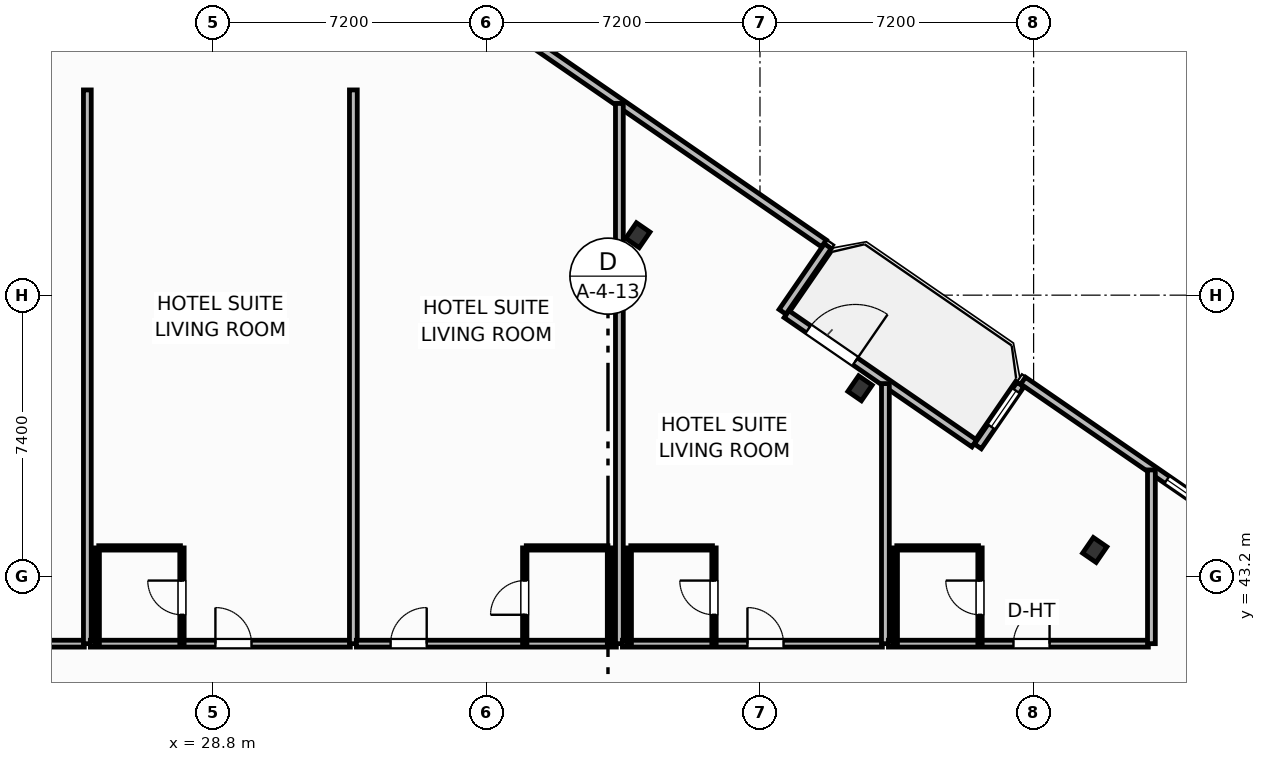
"""IFC4 building model, lengths in metres.
Left out: names, types, materials, properties, quantities, classifications, styles, units other than length and angle.
Written with IfcOpenShell. Run it as: python <this file> out.ifc"""

import sys

from ifc_helpers import new_model, si_unit, direction, frame, frame_2d, origin, origin_2d, place, context, subcontext, project, spatial, rectangle, i_section, extrude, element, fill, save


model = new_model("IFC4")
c1 = context("Model", 3, precision=1e-05, world=origin(), true_north=direction((0.0, 1.0)))
c2 = subcontext(c1, "Body", "Model", "MODEL_VIEW")
j1 = project(units=[si_unit("LENGTHUNIT", "METRE"), si_unit("PLANEANGLEUNIT", "RADIAN")], contexts=[c1])
p1 = place(None, origin())
s1 = spatial("IfcSite", under=j1, at=p1, CompositionType="ELEMENT")
p2 = place(p1, origin())
s2 = spatial("IfcBuilding", under=s1, at=p2, CompositionType="ELEMENT")
p3 = place(p2, frame((0.0, 0.0, 34.4)))
s3 = spatial("IfcBuildingStorey", under=s2, at=p3, CompositionType="ELEMENT", Elevation=34.4)
for number, where, z_axis, x_axis in (
    (1, (52.009, 43.896, 0.0), (0.0, 0.0, 1.0), (0.824, -0.567, 0.0)),
    (2, (45.833, 48.15, 0.0), (0.0, 0.0, 1.0), (0.824, -0.567, 0.0)),
    (3, (39.985, 52.177, 0.0), (0.0, 0.0, 1.0), (0.824, -0.567, 0.0)),
):
    element("IfcColumn", number, at=place(p3, frame(where, z_axis=z_axis, x_axis=x_axis)), inside=s3, PredefinedType="COLUMN", context=c2, shape_type="SweptSolid", body=[
        extrude(i_section(OverallWidth=0.432, OverallDepth=0.498, WebThickness=0.056, FlangeThickness=0.089, FilletRadius=0.025, at=origin_2d()), origin(), (0.0, 0.0, 1.0), 3.7),
    ])
p4 = place(p3, frame((43.898, 50.102, 0.0), z_axis=(0.0, 0.0, 1.0), x_axis=(0.823534636215, -0.567265989598, 0.0)))
e4 = element("IfcWall", 4, at=p4, inside=s3, PredefinedType="SOLIDWALL", context=c2, shape_type="SweptSolid", body=[
    extrude(rectangle(XDim=6.0, YDim=0.22, at=frame_2d((3.0, 0.0))), origin(), (0.0, 0.0, 1.0), 2.73),
])
p5 = place(p4, frame((0.696, 0.0, 0.0)))
e5 = element("IfcOpeningElement", 5, at=p5, cuts=e4, PredefinedType="OPENING", context=c2, shape_type="SweptSolid", body=[
    extrude(rectangle(XDim=1.5, YDim=2.25, at=frame_2d((0.75, 1.125))), frame((0.0, 0.12, 0.0), z_axis=(0.0, -1.0, 0.0), x_axis=(1.0, 0.0, 0.0)), (0.0, 0.0, 1.0), 0.24),
])
p6 = place(p3, frame((56.741, 43.793, 0.0), z_axis=(0.0, 0.0, 1.0), x_axis=(-0.823530942962, 0.56727135128, 0.0)))
e6 = element("IfcWall", 6, at=p6, inside=s3, PredefinedType="SOLIDWALL", context=c2, shape_type="SweptSolid", body=[
    extrude(rectangle(XDim=8.035, YDim=0.22, at=frame_2d((4.018, 0.0))), origin(), (0.0, 0.0, 1.0), 2.73),
])
p7 = place(p6, frame((1.788, 0.0, 0.8)))
e7 = element("IfcOpeningElement", 7, at=p7, cuts=e6, PredefinedType="OPENING", context=c2, shape_type="SweptSolid", body=[
    extrude(rectangle(XDim=1.65, YDim=1.65, at=frame_2d((0.825, 0.825))), frame((0.0, 0.12, 0.0), z_axis=(0.0, -1.0, 0.0), x_axis=(1.0, 0.0, 0.0)), (0.0, 0.0, 1.0), 0.24),
])
p8 = place(p3, frame((50.053, 48.248, 0.0), z_axis=(0.0, 0.0, 1.0), x_axis=(-0.567273565974, -0.823529417415, 0.0)))
e8 = element("IfcWall", 8, at=p8, inside=s3, PredefinedType="SOLIDWALL", context=c2, shape_type="SweptSolid", body=[
    extrude(rectangle(XDim=1.975, YDim=0.22, at=frame_2d((0.988, 0.0))), origin(), (0.0, 0.0, 1.0), 2.73),
])
p9 = place(p8, frame((0.2, 0.0, 0.8)))
e9 = element("IfcOpeningElement", 9, at=p9, cuts=e8, PredefinedType="OPENING", context=c2, shape_type="SweptSolid", body=[
    extrude(rectangle(XDim=1.15, YDim=1.4, at=frame_2d((0.575, 0.7))), frame((0.0, 0.12, 0.0), z_axis=(0.0, -1.0, 0.0), x_axis=(1.0, 0.0, 0.0)), (0.0, 0.0, 1.0), 0.24),
])
p10 = place(p3, frame((43.794, 50.161, 0.0), z_axis=(0.0, 0.0, 1.0), x_axis=(0.567352541689, 0.823475010816, 0.0)))
e10 = element("IfcWall", 10, at=p10, inside=s3, PredefinedType="SOLIDWALL", context=c2, shape_type="SweptSolid", body=[
    extrude(rectangle(XDim=2.1, YDim=0.22, at=frame_2d((1.05, 0.0))), origin(), (0.0, 0.0, 1.0), 2.73),
])
p11 = place(p3, frame((44.882, 51.962, 0.0), z_axis=(0.0, 0.0, 1.0), x_axis=(-0.823534427573, 0.567266292497, 0.0)))
e11 = element("IfcWall", 11, at=p11, inside=s3, PredefinedType="SOLIDWALL", context=c2, shape_type="SweptSolid", body=[
    extrude(rectangle(XDim=23.147, YDim=0.22, at=frame_2d((11.574, 0.0))), origin(), (0.0, 0.0, 1.0), 2.73),
])
p12 = place(p11, frame((10.749, 0.0, 0.8)))
e12 = element("IfcOpeningElement", 12, at=p12, cuts=e11, PredefinedType="OPENING", context=c2, shape_type="SweptSolid", body=[
    extrude(rectangle(XDim=1.65, YDim=1.65, at=frame_2d((0.825, 0.825))), frame((0.0, 0.12, 0.0), z_axis=(0.0, -1.0, 0.0), x_axis=(1.0, 0.0, 0.0)), (0.0, 0.0, 1.0), 0.24),
])
p13 = place(p3, frame((2.921, 41.43, 0.0), z_axis=(0.0, 0.0, 1.0), x_axis=(1.0, 0.0, 0.0)))
e13 = element("IfcWall", 13, at=p13, inside=s3, PredefinedType="PARTITIONING", context=c2, shape_type="SweptSolid", body=[
    extrude(rectangle(XDim=22.499, YDim=0.18, at=frame_2d((11.25, 0.0))), origin(), (0.0, 0.0, 1.0), 3.45),
])
p14 = place(p13, frame((18.35, 0.0, 0.0)))
e14 = element("IfcOpeningElement", 14, at=p14, cuts=e13, PredefinedType="OPENING", context=c2, shape_type="SweptSolid", body=[
    extrude(rectangle(XDim=0.95, YDim=2.15, at=frame_2d((0.475, 1.075))), frame((0.0, 0.1, 0.0), z_axis=(0.0, -1.0, 0.0), x_axis=(1.0, 0.0, 0.0)), (0.0, 0.0, 1.0), 0.2),
])
p15 = place(p3, frame((25.5, 41.43, 0.0), z_axis=(0.0, 0.0, 1.0), x_axis=(0.0, 1.0, 0.0)))
e15 = element("IfcWall", 15, at=p15, inside=s3, PredefinedType="PARTITIONING", context=c2, shape_type="SweptSolid", body=[
    extrude(rectangle(XDim=14.57, YDim=0.205, at=frame_2d((7.285, 0.0))), origin(), (0.0, 0.0, 1.0), 3.45),
])
p16 = place(p3, frame((25.58, 41.43, 0.0), z_axis=(0.0, 0.0, 1.0), x_axis=(1.0, 0.0, 0.0)))
e16 = element("IfcWall", 16, at=p16, inside=s3, PredefinedType="PARTITIONING", context=c2, shape_type="SweptSolid", body=[
    extrude(rectangle(XDim=6.84, YDim=0.18, at=frame_2d((3.42, 0.0))), origin(), (0.0, 0.0, 1.0), 3.45),
])
p17 = place(p16, frame((3.29, 0.0, 0.0)))
e17 = element("IfcOpeningElement", 17, at=p17, cuts=e16, PredefinedType="OPENING", context=c2, shape_type="SweptSolid", body=[
    extrude(rectangle(XDim=0.95, YDim=2.15, at=frame_2d((0.475, 1.075))), frame((0.0, 0.1, 0.0), z_axis=(0.0, -1.0, 0.0), x_axis=(1.0, 0.0, 0.0)), (0.0, 0.0, 1.0), 0.2),
])
p18 = place(p3, frame((25.8, 43.95, 0.0), z_axis=(0.0, 0.0, 1.0), x_axis=(1.0, 0.0, 0.0)))
e18 = element("IfcWall", 18, at=p18, inside=s3, PredefinedType="PARTITIONING", context=c2, shape_type="SweptSolid", body=[
    extrude(rectangle(XDim=2.15, YDim=0.115, at=frame_2d((1.075, 0.0))), origin(), (0.0, 0.0, 1.0), 3.45),
])
p19 = place(p3, frame((27.99, 41.43, 0.0), z_axis=(0.0, 0.0, 1.0), x_axis=(0.0, 1.0, 0.0)))
e19 = element("IfcWall", 19, at=p19, inside=s3, PredefinedType="PARTITIONING", context=c2, shape_type="SweptSolid", body=[
    extrude(rectangle(XDim=2.52, YDim=0.115, at=frame_2d((1.26, 0.0))), origin(), (0.0, 0.0, 1.0), 3.45),
])
p20 = place(p19, frame((0.76, 0.0, 0.0)))
e20 = element("IfcOpeningElement", 20, at=p20, cuts=e19, PredefinedType="OPENING", context=c2, shape_type="SweptSolid", body=[
    extrude(rectangle(XDim=0.9, YDim=2.05, at=frame_2d((0.45, 1.025))), frame((0.0, 0.067, 0.0), z_axis=(0.0, -1.0, 0.0), x_axis=(1.0, 0.0, 0.0)), (0.0, 0.0, 1.0), 0.135),
])
p21 = place(p3, frame((25.76, 41.43, 0.0), z_axis=(0.0, 0.0, 1.0), x_axis=(0.0, 1.0, 0.0)))
e21 = element("IfcWall", 21, at=p21, inside=s3, PredefinedType="PARTITIONING", context=c2, shape_type="SweptSolid", body=[
    extrude(rectangle(XDim=2.52, YDim=0.115, at=frame_2d((1.26, 0.0))), origin(), (0.0, 0.0, 1.0), 3.45),
])
p22 = place(p3, frame((32.5, 41.43, 0.0), z_axis=(0.0, 0.0, 1.0), x_axis=(0.0, 1.0, 0.0)))
e22 = element("IfcWall", 22, at=p22, inside=s3, PredefinedType="PARTITIONING", context=c2, shape_type="SweptSolid", body=[
    extrude(rectangle(XDim=14.57, YDim=0.205, at=frame_2d((7.285, 0.0))), origin(), (0.0, 0.0, 1.0), 3.45),
])
p23 = place(p3, frame((32.58, 41.43, 0.0), z_axis=(0.0, 0.0, 1.0), x_axis=(1.0, 0.0, 0.0)))
e23 = element("IfcWall", 23, at=p23, inside=s3, PredefinedType="PARTITIONING", context=c2, shape_type="SweptSolid", body=[
    extrude(rectangle(XDim=6.84, YDim=0.18, at=frame_2d((3.42, 0.0))), origin(), (0.0, 0.0, 1.0), 3.45),
])
p24 = place(p23, frame((0.9, 0.0, 0.0)))
e24 = element("IfcOpeningElement", 24, at=p24, cuts=e23, PredefinedType="OPENING", context=c2, shape_type="SweptSolid", body=[
    extrude(rectangle(XDim=0.95, YDim=2.15, at=frame_2d((0.475, 1.075))), frame((0.0, 0.1, 0.0), z_axis=(0.0, -1.0, 0.0), x_axis=(1.0, 0.0, 0.0)), (0.0, 0.0, 1.0), 0.2),
])
p25 = place(p3, frame((37.05, 43.95, 0.0), z_axis=(0.0, 0.0, 1.0), x_axis=(1.0, 0.0, 0.0)))
e25 = element("IfcWall", 25, at=p25, inside=s3, PredefinedType="PARTITIONING", context=c2, shape_type="SweptSolid", body=[
    extrude(rectangle(XDim=2.15, YDim=0.115, at=frame_2d((1.075, 0.0))), origin(), (0.0, 0.0, 1.0), 3.45),
])
p26 = place(p3, frame((37.01, 41.43, 0.0), z_axis=(0.0, 0.0, 1.0), x_axis=(0.0, 1.0, 0.0)))
e26 = element("IfcWall", 26, at=p26, inside=s3, PredefinedType="PARTITIONING", context=c2, shape_type="SweptSolid", body=[
    extrude(rectangle(XDim=2.52, YDim=0.115, at=frame_2d((1.26, 0.0))), origin(), (0.0, 0.0, 1.0), 3.45),
])
p27 = place(p26, frame((0.76, 0.0, 0.0)))
e27 = element("IfcOpeningElement", 27, at=p27, cuts=e26, PredefinedType="OPENING", context=c2, shape_type="SweptSolid", body=[
    extrude(rectangle(XDim=0.9, YDim=2.05, at=frame_2d((0.45, 1.025))), frame((0.0, 0.067, 0.0), z_axis=(0.0, -1.0, 0.0), x_axis=(1.0, 0.0, 0.0)), (0.0, 0.0, 1.0), 0.135),
])
p28 = place(p3, frame((39.24, 41.43, 0.0), z_axis=(0.0, 0.0, 1.0), x_axis=(0.0, 1.0, 0.0)))
e28 = element("IfcWall", 28, at=p28, inside=s3, PredefinedType="PARTITIONING", context=c2, shape_type="SweptSolid", body=[
    extrude(rectangle(XDim=2.52, YDim=0.115, at=frame_2d((1.26, 0.0))), origin(), (0.0, 0.0, 1.0), 3.45),
])
p29 = place(p3, frame((39.5, 41.43, 0.0), z_axis=(0.0, 0.0, 1.0), x_axis=(0.0, 1.0, 0.0)))
e29 = element("IfcWall", 29, at=p29, inside=s3, PredefinedType="PARTITIONING", context=c2, shape_type="SweptSolid", body=[
    extrude(rectangle(XDim=14.215, YDim=0.205, at=frame_2d((7.107, 0.0))), origin(), (0.0, 0.0, 1.0), 3.45),
])
p30 = place(p3, frame((39.58, 41.43, 0.0), z_axis=(0.0, 0.0, 1.0), x_axis=(1.0, 0.0, 0.0)))
e30 = element("IfcWall", 30, at=p30, inside=s3, PredefinedType="PARTITIONING", context=c2, shape_type="SweptSolid", body=[
    extrude(rectangle(XDim=6.84, YDim=0.18, at=frame_2d((3.42, 0.0))), origin(), (0.0, 0.0, 1.0), 3.45),
])
p31 = place(p30, frame((3.29, 0.0, 0.0)))
e31 = element("IfcOpeningElement", 31, at=p31, cuts=e30, PredefinedType="OPENING", context=c2, shape_type="SweptSolid", body=[
    extrude(rectangle(XDim=0.95, YDim=2.15, at=frame_2d((0.475, 1.075))), frame((0.0, 0.1, 0.0), z_axis=(0.0, -1.0, 0.0), x_axis=(1.0, 0.0, 0.0)), (0.0, 0.0, 1.0), 0.2),
])
p32 = place(p3, frame((39.8, 43.95, 0.0), z_axis=(0.0, 0.0, 1.0), x_axis=(1.0, 0.0, 0.0)))
e32 = element("IfcWall", 32, at=p32, inside=s3, PredefinedType="PARTITIONING", context=c2, shape_type="SweptSolid", body=[
    extrude(rectangle(XDim=2.15, YDim=0.115, at=frame_2d((1.075, 0.0))), origin(), (0.0, 0.0, 1.0), 3.45),
])
p33 = place(p3, frame((41.99, 41.43, 0.0), z_axis=(0.0, 0.0, 1.0), x_axis=(0.0, 1.0, 0.0)))
e33 = element("IfcWall", 33, at=p33, inside=s3, PredefinedType="PARTITIONING", context=c2, shape_type="SweptSolid", body=[
    extrude(rectangle(XDim=2.52, YDim=0.115, at=frame_2d((1.26, 0.0))), origin(), (0.0, 0.0, 1.0), 3.45),
])
p34 = place(p33, frame((0.76, 0.0, 0.0)))
e34 = element("IfcOpeningElement", 34, at=p34, cuts=e33, PredefinedType="OPENING", context=c2, shape_type="SweptSolid", body=[
    extrude(rectangle(XDim=0.9, YDim=2.05, at=frame_2d((0.45, 1.025))), frame((0.0, 0.067, 0.0), z_axis=(0.0, -1.0, 0.0), x_axis=(1.0, 0.0, 0.0)), (0.0, 0.0, 1.0), 0.135),
])
p35 = place(p3, frame((39.76, 41.43, 0.0), z_axis=(0.0, 0.0, 1.0), x_axis=(0.0, 1.0, 0.0)))
e35 = element("IfcWall", 35, at=p35, inside=s3, PredefinedType="PARTITIONING", context=c2, shape_type="SweptSolid", body=[
    extrude(rectangle(XDim=2.52, YDim=0.115, at=frame_2d((1.26, 0.0))), origin(), (0.0, 0.0, 1.0), 3.45),
])
p36 = place(p3, frame((46.5, 41.43, 0.0), z_axis=(0.0, 0.0, 1.0), x_axis=(0.0, 1.0, 0.0)))
e36 = element("IfcWall", 36, at=p36, inside=s3, PredefinedType="PARTITIONING", context=c2, shape_type="SweptSolid", body=[
    extrude(rectangle(XDim=6.843, YDim=0.205, at=frame_2d((3.421, 0.0))), origin(), (0.0, 0.0, 1.0), 2.58),
])
p37 = place(p3, frame((46.58, 41.43, 0.0), z_axis=(0.0, 0.0, 1.0), x_axis=(1.0, 0.0, 0.0)))
e37 = element("IfcWall", 37, at=p37, inside=s3, PredefinedType="PARTITIONING", context=c2, shape_type="SweptSolid", body=[
    extrude(rectangle(XDim=6.84, YDim=0.18, at=frame_2d((3.42, 0.0))), origin(), (0.0, 0.0, 1.0), 3.45),
])
p38 = place(p37, frame((3.29, 0.0, 0.0)))
e38 = element("IfcOpeningElement", 38, at=p38, cuts=e37, PredefinedType="OPENING", context=c2, shape_type="SweptSolid", body=[
    extrude(rectangle(XDim=0.95, YDim=2.15, at=frame_2d((0.475, 1.075))), frame((0.0, 0.1, 0.0), z_axis=(0.0, -1.0, 0.0), x_axis=(1.0, 0.0, 0.0)), (0.0, 0.0, 1.0), 0.2),
])
p39 = place(p3, frame((46.8, 43.95, 0.0), z_axis=(0.0, 0.0, 1.0), x_axis=(1.0, 0.0, 0.0)))
e39 = element("IfcWall", 39, at=p39, inside=s3, PredefinedType="PARTITIONING", context=c2, shape_type="SweptSolid", body=[
    extrude(rectangle(XDim=2.15, YDim=0.115, at=frame_2d((1.075, 0.0))), origin(), (0.0, 0.0, 1.0), 3.45),
])
p40 = place(p3, frame((48.99, 41.43, 0.0), z_axis=(0.0, 0.0, 1.0), x_axis=(0.0, 1.0, 0.0)))
e40 = element("IfcWall", 40, at=p40, inside=s3, PredefinedType="PARTITIONING", context=c2, shape_type="SweptSolid", body=[
    extrude(rectangle(XDim=2.52, YDim=0.115, at=frame_2d((1.26, 0.0))), origin(), (0.0, 0.0, 1.0), 3.45),
])
p41 = place(p40, frame((0.76, 0.0, 0.0)))
e41 = element("IfcOpeningElement", 41, at=p41, cuts=e40, PredefinedType="OPENING", context=c2, shape_type="SweptSolid", body=[
    extrude(rectangle(XDim=0.9, YDim=2.05, at=frame_2d((0.45, 1.025))), frame((0.0, 0.067, 0.0), z_axis=(0.0, -1.0, 0.0), x_axis=(1.0, 0.0, 0.0)), (0.0, 0.0, 1.0), 0.135),
])
p42 = place(p3, frame((46.76, 41.43, 0.0), z_axis=(0.0, 0.0, 1.0), x_axis=(0.0, 1.0, 0.0)))
e42 = element("IfcWall", 42, at=p42, inside=s3, PredefinedType="PARTITIONING", context=c2, shape_type="SweptSolid", body=[
    extrude(rectangle(XDim=2.52, YDim=0.115, at=frame_2d((1.26, 0.0))), origin(), (0.0, 0.0, 1.0), 2.58),
])
p43 = place(p3, frame((53.5, 41.43, 0.0), z_axis=(0.0, 0.0, 1.0), x_axis=(0.0, 1.0, 0.0)))
e43 = element("IfcWall", 43, at=p43, inside=s3, PredefinedType="PARTITIONING", context=c2, shape_type="SweptSolid", body=[
    extrude(rectangle(XDim=4.571, YDim=0.205, at=frame_2d((2.286, 0.0))), origin(), (0.0, 0.0, 1.0), 3.45),
])
p44 = place(p5, origin())
e44 = element("IfcDoor", 44, at=p44, inside=s3, OperationType="SINGLE_SWING_RIGHT", PredefinedType="DOOR", context=c2, shape_type="SweptSolid", body=[
    extrude(rectangle(XDim=1.5, YDim=2.25, at=frame_2d((0.75, 1.125))), frame((0.0, 0.025, 0.0), z_axis=(0.0, -1.0, 0.0), x_axis=(1.0, 0.0, 0.0)), (0.0, 0.0, 1.0), 0.05),
])
fill(e5, e44)
p45 = place(p7, origin())
e45 = element("IfcWindow", 45, at=p45, inside=s3, PartitioningType="SINGLE_PANEL", PredefinedType="WINDOW", context=c2, shape_type="SweptSolid", body=[
    extrude(rectangle(XDim=1.65, YDim=1.65, at=frame_2d((0.825, 0.825))), frame((0.0, 0.03, 0.0), z_axis=(0.0, -1.0, 0.0), x_axis=(1.0, 0.0, 0.0)), (0.0, 0.0, 1.0), 0.06),
])
fill(e7, e45)
p46 = place(p17, origin())
e46 = element("IfcDoor", 46, at=p46, inside=s3, OperationType="SINGLE_SWING_LEFT", PredefinedType="DOOR", context=c2, shape_type="SweptSolid", body=[
    extrude(rectangle(XDim=0.95, YDim=2.15, at=frame_2d((0.475, 1.075))), frame((0.0, 0.025, 0.0), z_axis=(0.0, -1.0, 0.0), x_axis=(1.0, 0.0, 0.0)), (0.0, 0.0, 1.0), 0.05),
])
fill(e17, e46)
p47 = place(p20, origin())
e47 = element("IfcDoor", 47, at=p47, inside=s3, OperationType="SINGLE_SWING_RIGHT", PredefinedType="DOOR", context=c2, shape_type="SweptSolid", body=[
    extrude(rectangle(XDim=0.9, YDim=2.05, at=frame_2d((0.45, 1.025))), frame((0.0, 0.025, 0.0), z_axis=(0.0, -1.0, 0.0), x_axis=(1.0, 0.0, 0.0)), (0.0, 0.0, 1.0), 0.05),
])
fill(e20, e47)
p48 = place(p24, origin())
e48 = element("IfcDoor", 48, at=p48, inside=s3, OperationType="SINGLE_SWING_RIGHT", PredefinedType="DOOR", context=c2, shape_type="SweptSolid", body=[
    extrude(rectangle(XDim=0.95, YDim=2.15, at=frame_2d((0.475, 1.075))), frame((0.0, 0.025, 0.0), z_axis=(0.0, -1.0, 0.0), x_axis=(1.0, 0.0, 0.0)), (0.0, 0.0, 1.0), 0.05),
])
fill(e24, e48)
p49 = place(p27, origin())
e49 = element("IfcDoor", 49, at=p49, inside=s3, OperationType="SINGLE_SWING_LEFT", PredefinedType="DOOR", context=c2, shape_type="SweptSolid", body=[
    extrude(rectangle(XDim=0.9, YDim=2.05, at=frame_2d((0.45, 1.025))), frame((0.0, 0.025, 0.0), z_axis=(0.0, -1.0, 0.0), x_axis=(1.0, 0.0, 0.0)), (0.0, 0.0, 1.0), 0.05),
])
fill(e27, e49)
p50 = place(p31, origin())
e50 = element("IfcDoor", 50, at=p50, inside=s3, OperationType="SINGLE_SWING_LEFT", PredefinedType="DOOR", context=c2, shape_type="SweptSolid", body=[
    extrude(rectangle(XDim=0.95, YDim=2.15, at=frame_2d((0.475, 1.075))), frame((0.0, 0.025, 0.0), z_axis=(0.0, -1.0, 0.0), x_axis=(1.0, 0.0, 0.0)), (0.0, 0.0, 1.0), 0.05),
])
fill(e31, e50)
p51 = place(p34, origin())
e51 = element("IfcDoor", 51, at=p51, inside=s3, OperationType="SINGLE_SWING_RIGHT", PredefinedType="DOOR", context=c2, shape_type="SweptSolid", body=[
    extrude(rectangle(XDim=0.9, YDim=2.05, at=frame_2d((0.45, 1.025))), frame((0.0, 0.025, 0.0), z_axis=(0.0, -1.0, 0.0), x_axis=(1.0, 0.0, 0.0)), (0.0, 0.0, 1.0), 0.05),
])
fill(e34, e51)
p52 = place(p38, origin())
e52 = element("IfcDoor", 52, at=p52, inside=s3, OperationType="SINGLE_SWING_RIGHT", PredefinedType="DOOR", context=c2, shape_type="SweptSolid", body=[
    extrude(rectangle(XDim=0.95, YDim=2.15, at=frame_2d((0.475, 1.075))), frame((0.0, 0.025, 0.0), z_axis=(0.0, -1.0, 0.0), x_axis=(1.0, 0.0, 0.0)), (0.0, 0.0, 1.0), 0.05),
])
fill(e38, e52)
p53 = place(p41, origin())
e53 = element("IfcDoor", 53, at=p53, inside=s3, OperationType="SINGLE_SWING_RIGHT", PredefinedType="DOOR", context=c2, shape_type="SweptSolid", body=[
    extrude(rectangle(XDim=0.9, YDim=2.05, at=frame_2d((0.45, 1.025))), frame((0.0, 0.025, 0.0), z_axis=(0.0, -1.0, 0.0), x_axis=(1.0, 0.0, 0.0)), (0.0, 0.0, 1.0), 0.05),
])
fill(e41, e53)
p54 = place(p9, origin())
e54 = element("IfcWindow", 54, at=p54, inside=s3, PartitioningType="SINGLE_PANEL", PredefinedType="WINDOW", context=c2, shape_type="SweptSolid", body=[
    extrude(rectangle(XDim=1.15, YDim=1.4, at=frame_2d((0.575, 0.7))), frame((0.0, 0.03, 0.0), z_axis=(0.0, -1.0, 0.0), x_axis=(1.0, 0.0, 0.0)), (0.0, 0.0, 1.0), 0.06),
])
fill(e9, e54)
save(model, sys.argv[1])
